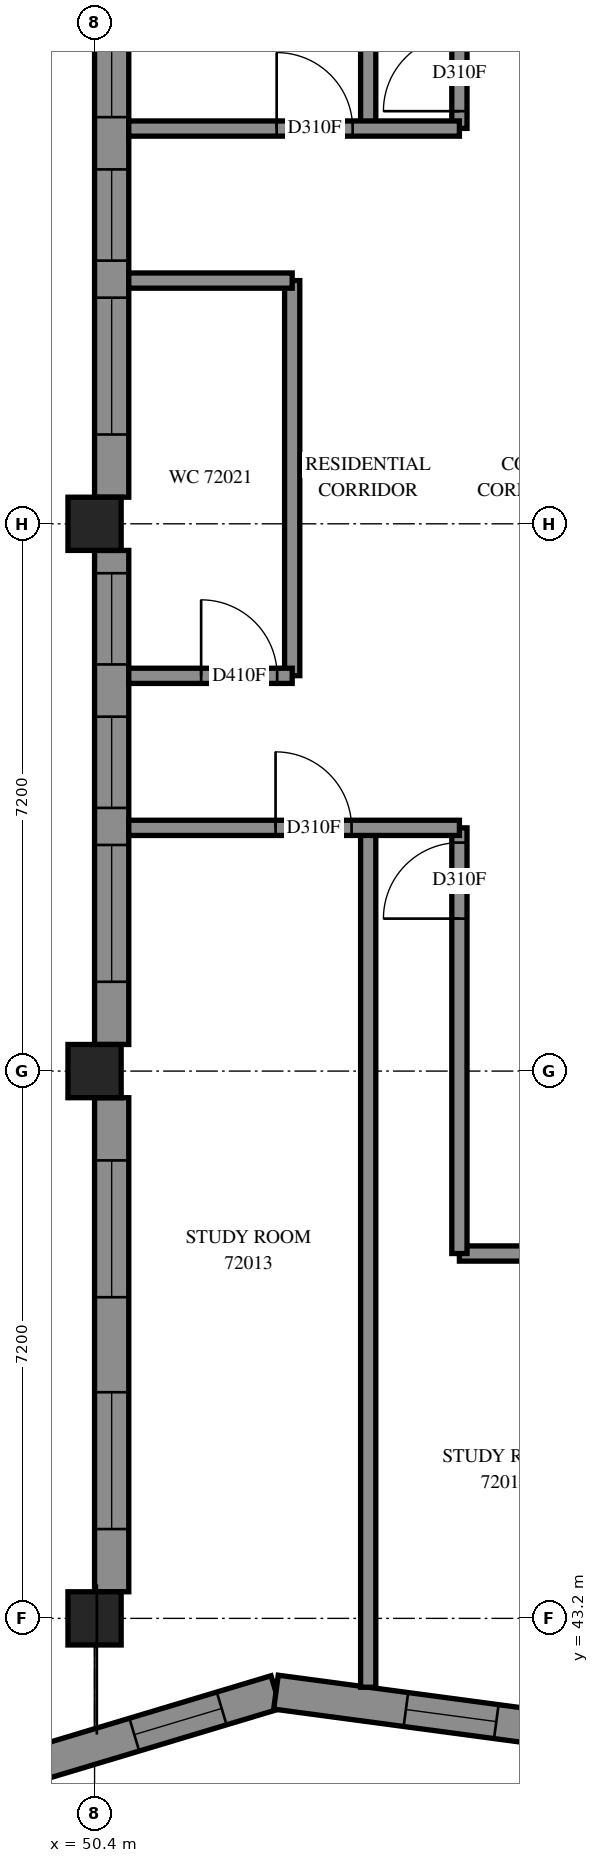
"""IFC4 building model, lengths in metres.
Left out: names, types, materials, properties, quantities, classifications, styles, units other than length and angle.
Written with IfcOpenShell. Run it as: python <this file> out.ifc"""

import sys

from ifc_helpers import new_model, si_unit, direction, frame, frame_2d, origin, origin_2d, place, context, subcontext, project, spatial, polyline, rectangle, outline, extrude, element, fill, save


model = new_model("IFC4")
c1 = context("Model", 3, precision=1e-05, world=origin(), true_north=direction((0.0, 1.0)))
c2 = subcontext(c1, "Body", "Model", "MODEL_VIEW")
j1 = project(units=[si_unit("LENGTHUNIT", "METRE"), si_unit("PLANEANGLEUNIT", "RADIAN")], contexts=[c1])
p1 = place(None, origin())
s1 = spatial("IfcSite", under=j1, at=p1, CompositionType="ELEMENT")
p2 = place(p1, origin())
s2 = spatial("IfcBuilding", under=s1, at=p2, CompositionType="ELEMENT")
p3 = place(p2, frame((0.0, 0.0, 264.2)))
s3 = spatial("IfcBuildingStorey", under=s2, at=p3, CompositionType="ELEMENT", Elevation=264.2)
for number, where, z_axis, x_axis in (
    (1, (50.4, 43.2, 0.0), (0.0, 0.0, 1.0), (1.0, 0.0, 0.0)),
    (2, (50.4, 50.4, 0.0), (0.0, 0.0, 1.0), (1.0, 0.0, 0.0)),
    (3, (50.4, 57.6, 0.0), (0.0, 0.0, 1.0), (1.0, 0.0, 0.0)),
):
    element("IfcColumn", number, at=place(p3, frame(where, z_axis=z_axis, x_axis=x_axis)), inside=s3, PredefinedType="COLUMN", context=c2, shape_type="SweptSolid", body=[
        extrude(rectangle(XDim=0.7, YDim=0.7, at=origin_2d()), origin(), (0.0, 0.0, 1.0), 3.1),
    ])
p4 = place(p3, frame((49.425, 41.221, 0.0), z_axis=(0.0, 0.0, 1.0), x_axis=(0.9577909885, 0.2874655149, 0.0)))
e4 = element("IfcWall", 4, at=p4, inside=s3, PredefinedType="SOLIDWALL", context=c2, shape_type="SweptSolid", body=[
    extrude(outline(polyline([(-0.302, -0.225), (3.461, -0.225), (3.558, 0.225), (0.302, 0.225), (-0.302, -0.225)])), origin(), (0.0, 0.0, 1.0), 3.1),
])
p5 = place(p4, frame((1.564, 0.0, 0.45)))
e5 = element("IfcOpeningElement", 5, at=p5, cuts=e4, PredefinedType="OPENING", context=c2, shape_type="SweptSolid", body=[
    extrude(rectangle(XDim=1.2, YDim=2.55, at=frame_2d((0.6, 1.275))), frame((0.0, 0.235, 0.0), z_axis=(0.0, -1.0, 0.0), x_axis=(1.0, 0.0, 0.0)), (0.0, 0.0, 1.0), 0.47),
])
p6 = place(p3, frame((52.786, 42.229, 0.0), z_axis=(0.0, 0.0, 1.0), x_axis=(0.991180049, -0.1325221131, 0.0)))
e6 = element("IfcWall", 6, at=p6, inside=s3, PredefinedType="SOLIDWALL", context=c2, shape_type="SweptSolid", body=[
    extrude(outline(polyline([(0.049, -0.225), (3.685, -0.225), (3.625, 0.225), (-0.049, 0.225), (0.049, -0.225)])), origin(), (0.0, 0.0, 1.0), 3.1),
])
p7 = place(p6, frame((1.725, 0.0, 0.45)))
e7 = element("IfcOpeningElement", 7, at=p7, cuts=e6, PredefinedType="OPENING", context=c2, shape_type="SweptSolid", body=[
    extrude(rectangle(XDim=1.2, YDim=2.55, at=frame_2d((0.6, 1.275))), frame((0.0, 0.235, 0.0), z_axis=(0.0, -1.0, 0.0), x_axis=(1.0, 0.0, 0.0)), (0.0, 0.0, 1.0), 0.47),
])
p8 = place(p3, frame((50.625, 64.45, 0.0), z_axis=(0.0, 0.0, 1.0), x_axis=(0.0, -1.0, 0.0)))
e8 = element("IfcWall", 8, at=p8, inside=s3, PredefinedType="SOLIDWALL", context=c2, shape_type="SweptSolid", body=[
    extrude(rectangle(XDim=6.5, YDim=0.45, at=frame_2d((3.25, 0.0))), origin(), (0.0, 0.0, 1.0), 3.1),
])
p9 = place(p8, frame((3.875, 0.0, 0.7)))
e9 = element("IfcOpeningElement", 9, at=p9, cuts=e8, PredefinedType="OPENING", context=c2, shape_type="SweptSolid", body=[
    extrude(rectangle(XDim=1.8, YDim=1.8, at=frame_2d((0.9, 0.9))), frame((0.0, 0.235, 0.0), z_axis=(0.0, -1.0, 0.0), x_axis=(1.0, 0.0, 0.0)), (0.0, 0.0, 1.0), 0.47),
])
p10 = place(p8, frame((0.3, 0.0, 0.6)))
e10 = element("IfcOpeningElement", 10, at=p10, cuts=e8, PredefinedType="OPENING", context=c2, shape_type="SweptSolid", body=[
    extrude(rectangle(XDim=1.2, YDim=1.9, at=frame_2d((0.6, 0.95))), frame((0.0, 0.235, 0.0), z_axis=(0.0, -1.0, 0.0), x_axis=(1.0, 0.0, 0.0)), (0.0, 0.0, 1.0), 0.47),
])
p11 = place(p8, frame((2.188, 0.0, 0.6)))
e11 = element("IfcOpeningElement", 11, at=p11, cuts=e8, PredefinedType="OPENING", context=c2, shape_type="SweptSolid", body=[
    extrude(rectangle(XDim=1.2, YDim=1.9, at=frame_2d((0.6, 0.95))), frame((0.0, 0.235, 0.0), z_axis=(0.0, -1.0, 0.0), x_axis=(1.0, 0.0, 0.0)), (0.0, 0.0, 1.0), 0.47),
])
p12 = place(p3, frame((50.625, 57.25, 0.0), z_axis=(0.0, 0.0, 1.0), x_axis=(0.0, -1.0, 0.0)))
e12 = element("IfcWall", 12, at=p12, inside=s3, PredefinedType="SOLIDWALL", context=c2, shape_type="SweptSolid", body=[
    extrude(rectangle(XDim=6.5, YDim=0.45, at=frame_2d((3.25, 0.0))), origin(), (0.0, 0.0, 1.0), 3.1),
])
p13 = place(p12, frame((3.875, 0.0, 0.7)))
e13 = element("IfcOpeningElement", 13, at=p13, cuts=e12, PredefinedType="OPENING", context=c2, shape_type="SweptSolid", body=[
    extrude(rectangle(XDim=1.8, YDim=1.8, at=frame_2d((0.9, 0.9))), frame((0.0, 0.235, 0.0), z_axis=(0.0, -1.0, 0.0), x_axis=(1.0, 0.0, 0.0)), (0.0, 0.0, 1.0), 0.47),
])
p14 = place(p12, frame((0.3, 0.0, 0.6)))
e14 = element("IfcOpeningElement", 14, at=p14, cuts=e12, PredefinedType="OPENING", context=c2, shape_type="SweptSolid", body=[
    extrude(rectangle(XDim=1.2, YDim=1.9, at=frame_2d((0.6, 0.95))), frame((0.0, 0.235, 0.0), z_axis=(0.0, -1.0, 0.0), x_axis=(1.0, 0.0, 0.0)), (0.0, 0.0, 1.0), 0.47),
])
p15 = place(p12, frame((2.188, 0.0, 0.6)))
e15 = element("IfcOpeningElement", 15, at=p15, cuts=e12, PredefinedType="OPENING", context=c2, shape_type="SweptSolid", body=[
    extrude(rectangle(XDim=1.2, YDim=1.9, at=frame_2d((0.6, 0.95))), frame((0.0, 0.235, 0.0), z_axis=(0.0, -1.0, 0.0), x_axis=(1.0, 0.0, 0.0)), (0.0, 0.0, 1.0), 0.47),
])
p16 = place(p3, frame((50.625, 50.05, 0.0), z_axis=(0.0, 0.0, 1.0), x_axis=(0.0, -1.0, 0.0)))
e16 = element("IfcWall", 16, at=p16, inside=s3, PredefinedType="SOLIDWALL", context=c2, shape_type="SweptSolid", body=[
    extrude(rectangle(XDim=6.5, YDim=0.45, at=frame_2d((3.25, 0.0))), origin(), (0.0, 0.0, 1.0), 3.1),
])
p17 = place(p16, frame((0.825, 0.0, 0.7)))
e17 = element("IfcOpeningElement", 17, at=p17, cuts=e16, PredefinedType="OPENING", context=c2, shape_type="SweptSolid", body=[
    extrude(rectangle(XDim=1.8, YDim=1.8, at=frame_2d((0.9, 0.9))), frame((0.0, 0.235, 0.0), z_axis=(0.0, -1.0, 0.0), x_axis=(1.0, 0.0, 0.0)), (0.0, 0.0, 1.0), 0.47),
])
p18 = place(p16, frame((3.875, 0.0, 0.7)))
e18 = element("IfcOpeningElement", 18, at=p18, cuts=e16, PredefinedType="OPENING", context=c2, shape_type="SweptSolid", body=[
    extrude(rectangle(XDim=1.8, YDim=1.8, at=frame_2d((0.9, 0.9))), frame((0.0, 0.235, 0.0), z_axis=(0.0, -1.0, 0.0), x_axis=(1.0, 0.0, 0.0)), (0.0, 0.0, 1.0), 0.47),
])
p19 = place(p3, frame((55.2, 48.0, 0.0), z_axis=(0.0, 0.0, 1.0), x_axis=(1.0, 0.0, 0.0)))
e19 = element("IfcWall", 19, at=p19, inside=s3, PredefinedType="PARTITIONING", context=c2, shape_type="SweptSolid", body=[
    extrude(rectangle(XDim=19.15, YDim=0.2, at=frame_2d((9.575, 0.0))), origin(), (0.0, 0.0, 1.0), 3.1),
])
p20 = place(p19, frame((4.475, 0.0, 0.0)))
e20 = element("IfcOpeningElement", 20, at=p20, cuts=e19, PredefinedType="OPENING", context=c2, shape_type="SweptSolid", body=[
    extrude(rectangle(XDim=1.0, YDim=2.1, at=frame_2d((0.5, 1.05))), frame((0.0, 0.11, 0.0), z_axis=(0.0, -1.0, 0.0), x_axis=(1.0, 0.0, 0.0)), (0.0, 0.0, 1.0), 0.22),
])
p21 = place(p19, frame((8.338, 0.0, 0.0)))
e21 = element("IfcOpeningElement", 21, at=p21, cuts=e19, PredefinedType="OPENING", context=c2, shape_type="SweptSolid", body=[
    extrude(rectangle(XDim=1.0, YDim=2.1, at=frame_2d((0.5, 1.05))), frame((0.0, 0.11, 0.0), z_axis=(0.0, -1.0, 0.0), x_axis=(1.0, 0.0, 0.0)), (0.0, 0.0, 1.0), 0.22),
])
p22 = place(p19, frame((13.707, 0.0, 0.0)))
e22 = element("IfcOpeningElement", 22, at=p22, cuts=e19, PredefinedType="OPENING", context=c2, shape_type="SweptSolid", body=[
    extrude(rectangle(XDim=1.0, YDim=2.1, at=frame_2d((0.5, 1.05))), frame((0.0, 0.11, 0.0), z_axis=(0.0, -1.0, 0.0), x_axis=(1.0, 0.0, 0.0)), (0.0, 0.0, 1.0), 0.22),
])
p23 = place(p3, frame((54.0, 42.294, 0.0), z_axis=(0.0, 0.0, 1.0), x_axis=(0.0, 1.0, 0.0)))
e23 = element("IfcWall", 23, at=p23, inside=s3, PredefinedType="PARTITIONING", context=c2, shape_type="SweptSolid", body=[
    extrude(rectangle(XDim=11.306, YDim=0.2, at=frame_2d((5.653, 0.0))), origin(), (0.0, 0.0, 1.0), 3.1),
])
p24 = place(p3, frame((54.0, 62.8, 0.0), z_axis=(0.0, 0.0, 1.0), x_axis=(0.0, 1.0, 0.0)))
e24 = element("IfcWall", 24, at=p24, inside=s3, PredefinedType="PARTITIONING", context=c2, shape_type="SweptSolid", body=[
    extrude(rectangle(XDim=10.031, YDim=0.2, at=frame_2d((5.015, 0.0))), origin(), (0.0, 0.0, 1.0), 3.1),
])
p25 = place(p3, frame((55.2, 48.0, 0.0), z_axis=(0.0, 0.0, 1.0), x_axis=(0.0, 1.0, 0.0)))
e25 = element("IfcWall", 25, at=p25, inside=s3, PredefinedType="PARTITIONING", context=c2, shape_type="SweptSolid", body=[
    extrude(rectangle(XDim=5.6, YDim=0.2, at=frame_2d((2.8, 0.0))), origin(), (0.0, 0.0, 1.0), 3.1),
])
p26 = place(p25, frame((4.406, 0.0, 0.0)))
e26 = element("IfcOpeningElement", 26, at=p26, cuts=e25, PredefinedType="OPENING", context=c2, shape_type="SweptSolid", body=[
    extrude(rectangle(XDim=1.0, YDim=2.1, at=frame_2d((0.5, 1.05))), frame((0.0, 0.11, 0.0), z_axis=(0.0, -1.0, 0.0), x_axis=(1.0, 0.0, 0.0)), (0.0, 0.0, 1.0), 0.22),
])
p27 = place(p3, frame((53.0, 55.602, 0.0), z_axis=(0.0, 0.0, 1.0), x_axis=(0.0, 1.0, 0.0)))
e27 = element("IfcWall", 27, at=p27, inside=s3, PredefinedType="PARTITIONING", context=c2, shape_type="SweptSolid", body=[
    extrude(rectangle(XDim=5.198, YDim=0.2, at=frame_2d((2.599, 0.0))), origin(), (0.0, 0.0, 1.0), 3.1),
])
p28 = place(p3, frame((55.2, 62.802, 0.0), z_axis=(0.0, 0.0, 1.0), x_axis=(0.0, 1.0, 0.0)))
e28 = element("IfcWall", 28, at=p28, inside=s3, PredefinedType="PARTITIONING", context=c2, shape_type="SweptSolid", body=[
    extrude(rectangle(XDim=4.398, YDim=0.2, at=frame_2d((2.199, 0.0))), origin(), (0.0, 0.0, 1.0), 3.1),
])
p29 = place(p28, frame((0.227, 0.0, 0.0)))
e29 = element("IfcOpeningElement", 29, at=p29, cuts=e28, PredefinedType="OPENING", context=c2, shape_type="SweptSolid", body=[
    extrude(rectangle(XDim=1.0, YDim=2.1, at=frame_2d((0.5, 1.05))), frame((0.0, 0.11, 0.0), z_axis=(0.0, -1.0, 0.0), x_axis=(1.0, 0.0, 0.0)), (0.0, 0.0, 1.0), 0.22),
])
p30 = place(p3, frame((50.85, 53.6, 0.0), z_axis=(0.0, 0.0, 1.0), x_axis=(1.0, 0.0, 0.0)))
e30 = element("IfcWall", 30, at=p30, inside=s3, PredefinedType="PARTITIONING", context=c2, shape_type="SweptSolid", body=[
    extrude(rectangle(XDim=4.35, YDim=0.2, at=frame_2d((2.175, 0.0))), origin(), (0.0, 0.0, 1.0), 3.1),
])
p31 = place(p30, frame((1.931, 0.0, 0.0)))
e31 = element("IfcOpeningElement", 31, at=p31, cuts=e30, PredefinedType="OPENING", context=c2, shape_type="SweptSolid", body=[
    extrude(rectangle(XDim=1.0, YDim=2.1, at=frame_2d((0.5, 1.05))), frame((0.0, 0.11, 0.0), z_axis=(0.0, -1.0, 0.0), x_axis=(1.0, 0.0, 0.0)), (0.0, 0.0, 1.0), 0.22),
])
p32 = place(p3, frame((50.85, 62.8, 0.0), z_axis=(0.0, 0.0, 1.0), x_axis=(1.0, 0.0, 0.0)))
e32 = element("IfcWall", 32, at=p32, inside=s3, PredefinedType="PARTITIONING", context=c2, shape_type="SweptSolid", body=[
    extrude(rectangle(XDim=4.35, YDim=0.2, at=frame_2d((2.175, 0.0))), origin(), (0.0, 0.0, 1.0), 3.1),
])
p33 = place(p32, frame((1.946, 0.0, 0.0)))
e33 = element("IfcOpeningElement", 33, at=p33, cuts=e32, PredefinedType="OPENING", context=c2, shape_type="SweptSolid", body=[
    extrude(rectangle(XDim=1.0, YDim=2.1, at=frame_2d((0.5, 1.05))), frame((0.0, 0.11, 0.0), z_axis=(0.0, -1.0, 0.0), x_axis=(1.0, 0.0, 0.0)), (0.0, 0.0, 1.0), 0.22),
])
p34 = place(p3, frame((50.85, 55.6, 0.0), z_axis=(0.0, 0.0, 1.0), x_axis=(1.0, 0.0, 0.0)))
e34 = element("IfcWall", 34, at=p34, inside=s3, PredefinedType="PARTITIONING", context=c2, shape_type="SweptSolid", body=[
    extrude(rectangle(XDim=2.15, YDim=0.2, at=frame_2d((1.075, 0.0))), origin(), (0.0, 0.0, 1.0), 3.1),
])
p35 = place(p34, frame((0.952, 0.0, 0.0)))
e35 = element("IfcOpeningElement", 35, at=p35, cuts=e34, PredefinedType="OPENING", context=c2, shape_type="SweptSolid", body=[
    extrude(rectangle(XDim=1.0, YDim=2.1, at=frame_2d((0.5, 1.05))), frame((0.0, 0.11, 0.0), z_axis=(0.0, -1.0, 0.0), x_axis=(1.0, 0.0, 0.0)), (0.0, 0.0, 1.0), 0.22),
])
p36 = place(p3, frame((50.85, 60.8, 0.0), z_axis=(0.0, 0.0, 1.0), x_axis=(1.0, 0.0, 0.0)))
e36 = element("IfcWall", 36, at=p36, inside=s3, PredefinedType="PARTITIONING", context=c2, shape_type="SweptSolid", body=[
    extrude(rectangle(XDim=2.15, YDim=0.2, at=frame_2d((1.075, 0.0))), origin(), (0.0, 0.0, 1.0), 3.1),
])
p37 = place(p5, origin())
e37 = element("IfcWindow", 37, at=p37, inside=s3, PartitioningType="SINGLE_PANEL", PredefinedType="WINDOW", context=c2, shape_type="SweptSolid", body=[
    extrude(rectangle(XDim=1.2, YDim=2.55, at=frame_2d((0.6, 1.275))), frame((0.0, 0.205, 0.0), z_axis=(0.0, -1.0, 0.0), x_axis=(1.0, 0.0, 0.0)), (0.0, 0.0, 1.0), 0.06),
])
fill(e5, e37)
p38 = place(p7, origin())
e38 = element("IfcWindow", 38, at=p38, inside=s3, PartitioningType="SINGLE_PANEL", PredefinedType="WINDOW", context=c2, shape_type="SweptSolid", body=[
    extrude(rectangle(XDim=1.2, YDim=2.55, at=frame_2d((0.6, 1.275))), frame((0.0, 0.205, 0.0), z_axis=(0.0, -1.0, 0.0), x_axis=(1.0, 0.0, 0.0)), (0.0, 0.0, 1.0), 0.06),
])
fill(e7, e38)
p39 = place(p9, origin())
e39 = element("IfcWindow", 39, at=p39, inside=s3, PartitioningType="SINGLE_PANEL", PredefinedType="WINDOW", context=c2, shape_type="SweptSolid", body=[
    extrude(rectangle(XDim=1.8, YDim=1.8, at=frame_2d((0.9, 0.9))), frame((0.0, 0.205, 0.0), z_axis=(0.0, -1.0, 0.0), x_axis=(1.0, 0.0, 0.0)), (0.0, 0.0, 1.0), 0.06),
])
fill(e9, e39)
p40 = place(p13, origin())
e40 = element("IfcWindow", 40, at=p40, inside=s3, PartitioningType="SINGLE_PANEL", PredefinedType="WINDOW", context=c2, shape_type="SweptSolid", body=[
    extrude(rectangle(XDim=1.8, YDim=1.8, at=frame_2d((0.9, 0.9))), frame((0.0, 0.205, 0.0), z_axis=(0.0, -1.0, 0.0), x_axis=(1.0, 0.0, 0.0)), (0.0, 0.0, 1.0), 0.06),
])
fill(e13, e40)
p41 = place(p17, origin())
e41 = element("IfcWindow", 41, at=p41, inside=s3, PartitioningType="SINGLE_PANEL", PredefinedType="WINDOW", context=c2, shape_type="SweptSolid", body=[
    extrude(rectangle(XDim=1.8, YDim=1.8, at=frame_2d((0.9, 0.9))), frame((0.0, 0.205, 0.0), z_axis=(0.0, -1.0, 0.0), x_axis=(1.0, 0.0, 0.0)), (0.0, 0.0, 1.0), 0.06),
])
fill(e17, e41)
p42 = place(p18, origin())
e42 = element("IfcWindow", 42, at=p42, inside=s3, PartitioningType="SINGLE_PANEL", PredefinedType="WINDOW", context=c2, shape_type="SweptSolid", body=[
    extrude(rectangle(XDim=1.8, YDim=1.8, at=frame_2d((0.9, 0.9))), frame((0.0, 0.205, 0.0), z_axis=(0.0, -1.0, 0.0), x_axis=(1.0, 0.0, 0.0)), (0.0, 0.0, 1.0), 0.06),
])
fill(e18, e42)
p43 = place(p31, origin())
e43 = element("IfcDoor", 43, at=p43, inside=s3, OperationType="SINGLE_SWING_LEFT", PredefinedType="DOOR", context=c2, shape_type="SweptSolid", body=[
    extrude(rectangle(XDim=1.0, YDim=2.1, at=frame_2d((0.5, 1.05))), frame((0.0, 0.025, 0.0), z_axis=(0.0, -1.0, 0.0), x_axis=(1.0, 0.0, 0.0)), (0.0, 0.0, 1.0), 0.05),
])
fill(e31, e43)
p44 = place(p26, origin())
e44 = element("IfcDoor", 44, at=p44, inside=s3, OperationType="SINGLE_SWING_RIGHT", PredefinedType="DOOR", context=c2, shape_type="SweptSolid", body=[
    extrude(rectangle(XDim=1.0, YDim=2.1, at=frame_2d((0.5, 1.05))), frame((0.0, 0.025, 0.0), z_axis=(0.0, -1.0, 0.0), x_axis=(1.0, 0.0, 0.0)), (0.0, 0.0, 1.0), 0.05),
])
fill(e26, e44)
p45 = place(p35, origin())
e45 = element("IfcDoor", 45, at=p45, inside=s3, OperationType="SINGLE_SWING_RIGHT", PredefinedType="DOOR", context=c2, shape_type="SweptSolid", body=[
    extrude(rectangle(XDim=1.0, YDim=2.1, at=frame_2d((0.5, 1.05))), frame((0.0, 0.025, 0.0), z_axis=(0.0, -1.0, 0.0), x_axis=(1.0, 0.0, 0.0)), (0.0, 0.0, 1.0), 0.05),
])
fill(e35, e45)
p46 = place(p33, origin())
e46 = element("IfcDoor", 46, at=p46, inside=s3, OperationType="SINGLE_SWING_RIGHT", PredefinedType="DOOR", context=c2, shape_type="SweptSolid", body=[
    extrude(rectangle(XDim=1.0, YDim=2.1, at=frame_2d((0.5, 1.05))), frame((0.0, 0.025, 0.0), z_axis=(0.0, -1.0, 0.0), x_axis=(1.0, 0.0, 0.0)), (0.0, 0.0, 1.0), 0.05),
])
fill(e33, e46)
p47 = place(p29, origin())
e47 = element("IfcDoor", 47, at=p47, inside=s3, OperationType="SINGLE_SWING_LEFT", PredefinedType="DOOR", context=c2, shape_type="SweptSolid", body=[
    extrude(rectangle(XDim=1.0, YDim=2.1, at=frame_2d((0.5, 1.05))), frame((0.0, 0.025, 0.0), z_axis=(0.0, -1.0, 0.0), x_axis=(1.0, 0.0, 0.0)), (0.0, 0.0, 1.0), 0.05),
])
fill(e29, e47)
p48 = place(p10, origin())
e48 = element("IfcWindow", 48, at=p48, inside=s3, PartitioningType="SINGLE_PANEL", PredefinedType="WINDOW", context=c2, shape_type="SweptSolid", body=[
    extrude(rectangle(XDim=1.2, YDim=1.9, at=frame_2d((0.6, 0.95))), frame((0.0, 0.205, 0.0), z_axis=(0.0, -1.0, 0.0), x_axis=(1.0, 0.0, 0.0)), (0.0, 0.0, 1.0), 0.06),
])
fill(e10, e48)
p49 = place(p11, origin())
e49 = element("IfcWindow", 49, at=p49, inside=s3, PartitioningType="SINGLE_PANEL", PredefinedType="WINDOW", context=c2, shape_type="SweptSolid", body=[
    extrude(rectangle(XDim=1.2, YDim=1.9, at=frame_2d((0.6, 0.95))), frame((0.0, 0.205, 0.0), z_axis=(0.0, -1.0, 0.0), x_axis=(1.0, 0.0, 0.0)), (0.0, 0.0, 1.0), 0.06),
])
fill(e11, e49)
p50 = place(p14, origin())
e50 = element("IfcWindow", 50, at=p50, inside=s3, PartitioningType="SINGLE_PANEL", PredefinedType="WINDOW", context=c2, shape_type="SweptSolid", body=[
    extrude(rectangle(XDim=1.2, YDim=1.9, at=frame_2d((0.6, 0.95))), frame((0.0, 0.205, 0.0), z_axis=(0.0, -1.0, 0.0), x_axis=(1.0, 0.0, 0.0)), (0.0, 0.0, 1.0), 0.06),
])
fill(e14, e50)
p51 = place(p15, origin())
e51 = element("IfcWindow", 51, at=p51, inside=s3, PartitioningType="SINGLE_PANEL", PredefinedType="WINDOW", context=c2, shape_type="SweptSolid", body=[
    extrude(rectangle(XDim=1.2, YDim=1.9, at=frame_2d((0.6, 0.95))), frame((0.0, 0.205, 0.0), z_axis=(0.0, -1.0, 0.0), x_axis=(1.0, 0.0, 0.0)), (0.0, 0.0, 1.0), 0.06),
])
fill(e15, e51)
save(model, sys.argv[1])
